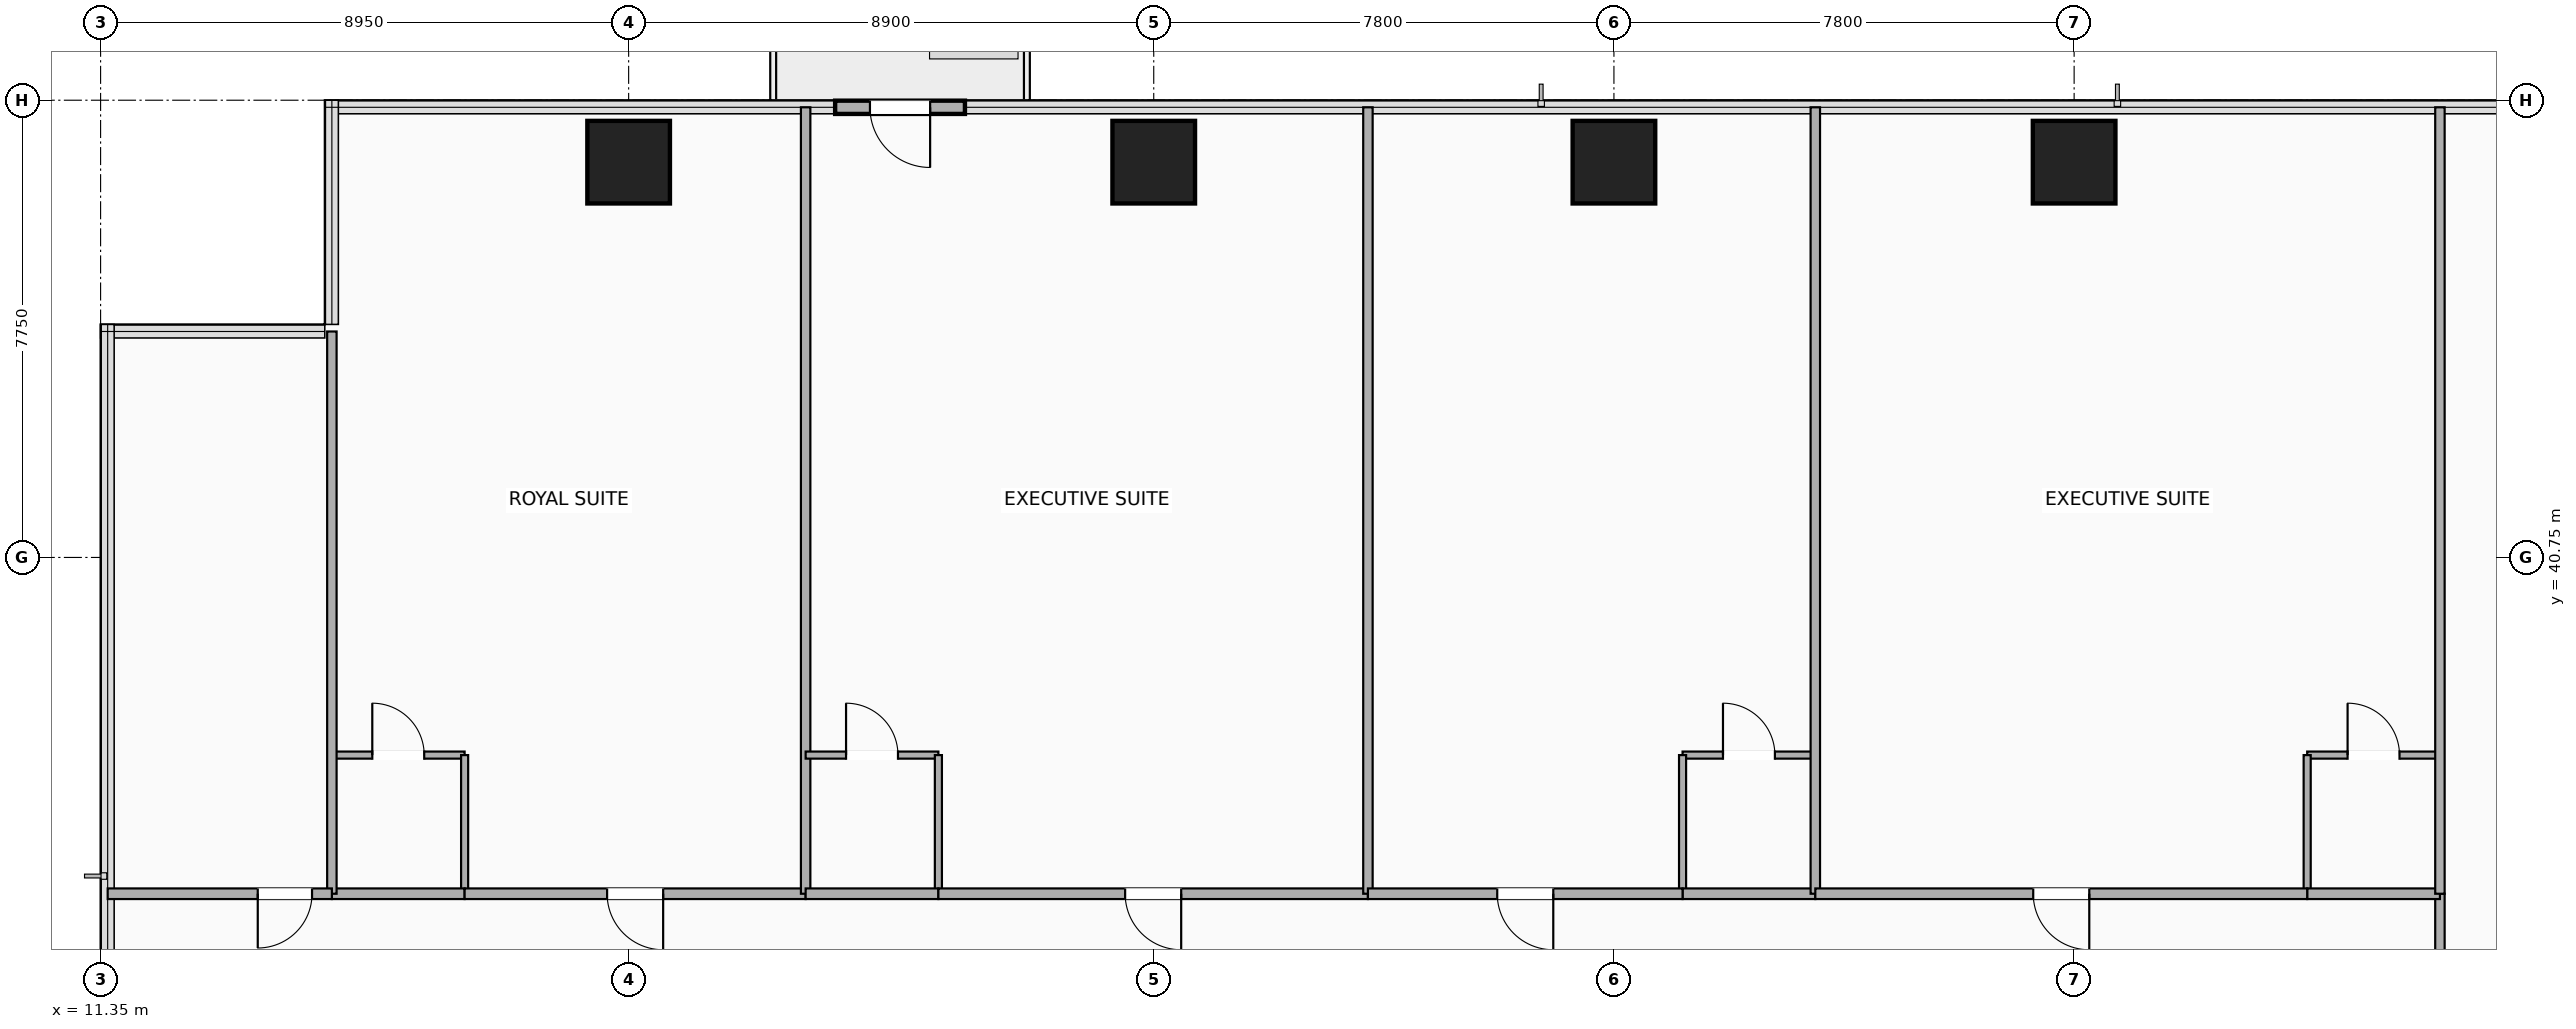
"""IFC4 building model, lengths in metres.
Left out: names, types, materials, properties, quantities, classifications, styles, units other than length and angle.
Written with IfcOpenShell. Run it as: python <this file> out.ifc"""

import sys

from ifc_helpers import new_model, si_unit, direction, frame, frame_2d, origin, origin_2d, place, context, subcontext, project, spatial, rectangle, extrude, element, fill, save


model = new_model("IFC4")
c1 = context("Model", 3, precision=1e-05, world=origin(), true_north=direction((0.0, 1.0)))
c2 = subcontext(c1, "Body", "Model", "MODEL_VIEW")
j1 = project(units=[si_unit("LENGTHUNIT", "METRE"), si_unit("PLANEANGLEUNIT", "RADIAN")], contexts=[c1])
p1 = place(None, origin())
s1 = spatial("IfcSite", under=j1, at=p1, CompositionType="ELEMENT")
p2 = place(p1, origin())
s2 = spatial("IfcBuilding", under=s1, at=p2, CompositionType="ELEMENT")
p3 = place(p2, frame((0.0, 0.0, 68.4)))
s3 = spatial("IfcBuildingStorey", under=s2, at=p3, CompositionType="ELEMENT", Elevation=68.4)
for number, where, z_axis, x_axis in (
    (1, (20.3, 47.45, -0.28), (0.0, 0.0, 1.0), (1.0, 0.0, 0.0)),
    (2, (29.2, 47.45, -0.28), (0.0, 0.0, 1.0), (1.0, 0.0, 0.0)),
    (3, (37.0, 47.45, -0.28), (0.0, 0.0, 1.0), (1.0, 0.0, 0.0)),
    (4, (44.8, 47.45, -0.28), (0.0, 0.0, 1.0), (1.0, 0.0, 0.0)),
):
    element("IfcColumn", number, at=place(p3, frame(where, z_axis=z_axis, x_axis=x_axis)), inside=s3, PredefinedType="COLUMN", context=c2, shape_type="SweptSolid", body=[
        extrude(rectangle(XDim=1.4, YDim=1.4, at=origin_2d()), origin(), (0.0, 0.0, 1.0), 3.5),
    ])
p4 = place(p3, frame((23.8, 48.38, 0.0), z_axis=(0.0, 0.0, 1.0), x_axis=(1.0, 0.0, 0.0)))
e5 = element("IfcWall", 5, at=p4, inside=s3, PredefinedType="SOLIDWALL", context=c2, shape_type="SweptSolid", body=[
    extrude(rectangle(XDim=2.2, YDim=0.225, at=frame_2d((1.1, 0.0))), origin(), (0.0, 0.0, 1.0), 3.22),
])
p5 = place(p4, frame((0.59, 0.0, 0.0)))
e6 = element("IfcOpeningElement", 6, at=p5, cuts=e5, PredefinedType="OPENING", context=c2, shape_type="SweptSolid", body=[
    extrude(rectangle(XDim=1.02, YDim=2.1, at=frame_2d((0.51, 1.05))), frame((0.0, 0.123, 0.0), z_axis=(0.0, -1.0, 0.0), x_axis=(1.0, 0.0, 0.0)), (0.0, 0.0, 1.0), 0.245),
])
p6 = place(p3, frame((51.0, 33.0, 0.0), z_axis=(0.0, 0.0, 1.0), x_axis=(0.0, 1.0, 0.0)))
e7 = element("IfcWall", 7, at=p6, inside=s3, PredefinedType="PARTITIONING", context=c2, shape_type="SweptSolid", body=[
    extrude(rectangle(XDim=2.05, YDim=0.16, at=frame_2d((1.025, 0.0))), origin(), (0.0, 0.0, 1.0), 2.51),
])
p7 = place(p3, frame((15.27, 37.4, 0.0), z_axis=(0.0, 0.0, 1.0), x_axis=(1.0, 0.0, 0.0)))
e8 = element("IfcWall", 8, at=p7, inside=s3, PredefinedType="PARTITIONING", context=c2, shape_type="SweptSolid", body=[
    extrude(rectangle(XDim=2.25, YDim=0.12, at=frame_2d((1.125, 0.0))), origin(), (0.0, 0.0, 1.0), 3.22),
])
p8 = place(p7, frame((1.565, 0.0, 0.0), z_axis=(0.0, 0.0, 1.0), x_axis=(-1.0, 0.0, 0.0)))
e9 = element("IfcOpeningElement", 9, at=p8, cuts=e8, PredefinedType="OPENING", context=c2, shape_type="SweptSolid", body=[
    extrude(rectangle(XDim=0.88, YDim=2.08, at=frame_2d((0.44, 1.04))), frame((0.0, 0.07, 0.0), z_axis=(0.0, -1.0, 0.0), x_axis=(1.0, 0.0, 0.0)), (0.0, 0.0, 1.0), 0.14),
])
p9 = place(p3, frame((17.52, 35.05, 0.0), z_axis=(0.0, 0.0, 1.0), x_axis=(0.0, 1.0, 0.0)))
e10 = element("IfcWall", 10, at=p9, inside=s3, PredefinedType="PARTITIONING", context=c2, shape_type="SweptSolid", body=[
    extrude(rectangle(XDim=2.35, YDim=0.12, at=frame_2d((1.175, 0.0))), origin(), (0.0, 0.0, 1.0), 3.22),
])
p10 = place(p3, frame((15.27, 35.05, 0.0), z_axis=(0.0, 0.0, 1.0), x_axis=(1.0, 0.0, 0.0)))
e11 = element("IfcWall", 11, at=p10, inside=s3, PredefinedType="PARTITIONING", context=c2, shape_type="SweptSolid", body=[
    extrude(rectangle(XDim=2.25, YDim=0.18, at=frame_2d((1.125, 0.0))), origin(), (0.0, 0.0, 1.0), 3.22),
])
p11 = place(p3, frame((17.52, 35.05, 0.0), z_axis=(0.0, 0.0, 1.0), x_axis=(1.0, 0.0, 0.0)))
e12 = element("IfcWall", 12, at=p11, inside=s3, PredefinedType="PARTITIONING", context=c2, shape_type="SweptSolid", body=[
    extrude(rectangle(XDim=5.78, YDim=0.18, at=frame_2d((2.89, 0.0))), origin(), (0.0, 0.0, 1.0), 2.51),
])
p12 = place(p11, frame((2.415, 0.0, 0.0)))
e13 = element("IfcOpeningElement", 13, at=p12, cuts=e12, PredefinedType="OPENING", context=c2, shape_type="SweptSolid", body=[
    extrude(rectangle(XDim=0.95, YDim=2.15, at=frame_2d((0.475, 1.075))), frame((0.0, 0.1, 0.0), z_axis=(0.0, -1.0, 0.0), x_axis=(1.0, 0.0, 0.0)), (0.0, 0.0, 1.0), 0.2),
])
p13 = place(p3, frame((15.27, 35.05, 0.0), z_axis=(0.0, 0.0, 1.0), x_axis=(0.0, 1.0, 0.0)))
e14 = element("IfcWall", 14, at=p13, inside=s3, PredefinedType="PARTITIONING", context=c2, shape_type="SweptSolid", body=[
    extrude(rectangle(XDim=9.53, YDim=0.16, at=frame_2d((4.765, 0.0))), origin(), (0.0, 0.0, 1.0), 3.22),
])
p14 = place(p3, frame((23.3, 35.05, 0.0), z_axis=(0.0, 0.0, 1.0), x_axis=(0.0, 1.0, 0.0)))
e15 = element("IfcWall", 15, at=p14, inside=s3, PredefinedType="PARTITIONING", context=c2, shape_type="SweptSolid", body=[
    extrude(rectangle(XDim=13.33, YDim=0.16, at=frame_2d((6.665, 0.0))), origin(), (0.0, 0.0, 1.0), 2.583),
])
p15 = place(p3, frame((23.3, 37.4, 0.0), z_axis=(0.0, 0.0, 1.0), x_axis=(1.0, 0.0, 0.0)))
e16 = element("IfcWall", 16, at=p15, inside=s3, PredefinedType="PARTITIONING", context=c2, shape_type="SweptSolid", body=[
    extrude(rectangle(XDim=2.25, YDim=0.12, at=frame_2d((1.125, 0.0))), origin(), (0.0, 0.0, 1.0), 3.22),
])
p16 = place(p15, frame((1.565, 0.0, 0.0), z_axis=(0.0, 0.0, 1.0), x_axis=(-1.0, 0.0, 0.0)))
e17 = element("IfcOpeningElement", 17, at=p16, cuts=e16, PredefinedType="OPENING", context=c2, shape_type="SweptSolid", body=[
    extrude(rectangle(XDim=0.88, YDim=2.08, at=frame_2d((0.44, 1.04))), frame((0.0, 0.07, 0.0), z_axis=(0.0, -1.0, 0.0), x_axis=(1.0, 0.0, 0.0)), (0.0, 0.0, 1.0), 0.14),
])
p17 = place(p3, frame((25.55, 35.05, 0.0), z_axis=(0.0, 0.0, 1.0), x_axis=(0.0, 1.0, 0.0)))
e18 = element("IfcWall", 18, at=p17, inside=s3, PredefinedType="PARTITIONING", context=c2, shape_type="SweptSolid", body=[
    extrude(rectangle(XDim=2.35, YDim=0.12, at=frame_2d((1.175, 0.0))), origin(), (0.0, 0.0, 1.0), 2.902),
])
p18 = place(p3, frame((23.3, 35.05, 0.0), z_axis=(0.0, 0.0, 1.0), x_axis=(1.0, 0.0, 0.0)))
e19 = element("IfcWall", 19, at=p18, inside=s3, PredefinedType="PARTITIONING", context=c2, shape_type="SweptSolid", body=[
    extrude(rectangle(XDim=2.25, YDim=0.18, at=frame_2d((1.125, 0.0))), origin(), (0.0, 0.0, 1.0), 3.22),
])
p19 = place(p3, frame((25.55, 35.05, 0.0), z_axis=(0.0, 0.0, 1.0), x_axis=(1.0, 0.0, 0.0)))
e20 = element("IfcWall", 20, at=p19, inside=s3, PredefinedType="PARTITIONING", context=c2, shape_type="SweptSolid", body=[
    extrude(rectangle(XDim=7.28, YDim=0.18, at=frame_2d((3.64, 0.0))), origin(), (0.0, 0.0, 1.0), 2.51),
])
p20 = place(p19, frame((3.165, 0.0, 0.0)))
e21 = element("IfcOpeningElement", 21, at=p20, cuts=e20, PredefinedType="OPENING", context=c2, shape_type="SweptSolid", body=[
    extrude(rectangle(XDim=0.95, YDim=2.15, at=frame_2d((0.475, 1.075))), frame((0.0, 0.1, 0.0), z_axis=(0.0, -1.0, 0.0), x_axis=(1.0, 0.0, 0.0)), (0.0, 0.0, 1.0), 0.2),
])
p21 = place(p3, frame((32.83, 35.05, 0.0), z_axis=(0.0, 0.0, 1.0), x_axis=(0.0, 1.0, 0.0)))
e22 = element("IfcWall", 22, at=p21, inside=s3, PredefinedType="PARTITIONING", context=c2, shape_type="SweptSolid", body=[
    extrude(rectangle(XDim=13.33, YDim=0.16, at=frame_2d((6.665, 0.0))), origin(), (0.0, 0.0, 1.0), 2.583),
])
p22 = place(p3, frame((38.163, 37.4, 0.0), z_axis=(0.0, 0.0, 1.0), x_axis=(1.0, 0.0, 0.0)))
e23 = element("IfcWall", 23, at=p22, inside=s3, PredefinedType="PARTITIONING", context=c2, shape_type="SweptSolid", body=[
    extrude(rectangle(XDim=2.25, YDim=0.12, at=frame_2d((1.125, 0.0))), origin(), (0.0, 0.0, 1.0), 3.22),
])
p23 = place(p22, frame((1.565, 0.0, 0.0), z_axis=(0.0, 0.0, 1.0), x_axis=(-1.0, 0.0, 0.0)))
e24 = element("IfcOpeningElement", 24, at=p23, cuts=e23, PredefinedType="OPENING", context=c2, shape_type="SweptSolid", body=[
    extrude(rectangle(XDim=0.88, YDim=2.08, at=frame_2d((0.44, 1.04))), frame((0.0, 0.07, 0.0), z_axis=(0.0, -1.0, 0.0), x_axis=(1.0, 0.0, 0.0)), (0.0, 0.0, 1.0), 0.14),
])
p24 = place(p3, frame((38.163, 35.05, 0.0), z_axis=(0.0, 0.0, 1.0), x_axis=(0.0, 1.0, 0.0)))
e25 = element("IfcWall", 25, at=p24, inside=s3, PredefinedType="PARTITIONING", context=c2, shape_type="SweptSolid", body=[
    extrude(rectangle(XDim=2.35, YDim=0.12, at=frame_2d((1.175, 0.0))), origin(), (0.0, 0.0, 1.0), 2.902),
])
p25 = place(p3, frame((38.163, 35.05, 0.0), z_axis=(0.0, 0.0, 1.0), x_axis=(1.0, 0.0, 0.0)))
e26 = element("IfcWall", 26, at=p25, inside=s3, PredefinedType="PARTITIONING", context=c2, shape_type="SweptSolid", body=[
    extrude(rectangle(XDim=2.25, YDim=0.18, at=frame_2d((1.125, 0.0))), origin(), (0.0, 0.0, 1.0), 3.22),
])
p26 = place(p3, frame((32.83, 35.05, 0.0), z_axis=(0.0, 0.0, 1.0), x_axis=(1.0, 0.0, 0.0)))
e27 = element("IfcWall", 27, at=p26, inside=s3, PredefinedType="PARTITIONING", context=c2, shape_type="SweptSolid", body=[
    extrude(rectangle(XDim=5.333, YDim=0.18, at=frame_2d((2.667, 0.0))), origin(), (0.0, 0.0, 1.0), 2.51),
])
p27 = place(p26, frame((2.191, 0.0, 0.0)))
e28 = element("IfcOpeningElement", 28, at=p27, cuts=e27, PredefinedType="OPENING", context=c2, shape_type="SweptSolid", body=[
    extrude(rectangle(XDim=0.95, YDim=2.15, at=frame_2d((0.475, 1.075))), frame((0.0, 0.1, 0.0), z_axis=(0.0, -1.0, 0.0), x_axis=(1.0, 0.0, 0.0)), (0.0, 0.0, 1.0), 0.2),
])
p28 = place(p3, frame((40.413, 35.05, 0.0), z_axis=(0.0, 0.0, 1.0), x_axis=(0.0, 1.0, 0.0)))
e29 = element("IfcWall", 29, at=p28, inside=s3, PredefinedType="PARTITIONING", context=c2, shape_type="SweptSolid", body=[
    extrude(rectangle(XDim=13.33, YDim=0.16, at=frame_2d((6.665, 0.0))), origin(), (0.0, 0.0, 1.0), 2.583),
])
p29 = place(p3, frame((48.75, 37.4, 0.0), z_axis=(0.0, 0.0, 1.0), x_axis=(1.0, 0.0, 0.0)))
e30 = element("IfcWall", 30, at=p29, inside=s3, PredefinedType="PARTITIONING", context=c2, shape_type="SweptSolid", body=[
    extrude(rectangle(XDim=2.25, YDim=0.12, at=frame_2d((1.125, 0.0))), origin(), (0.0, 0.0, 1.0), 3.22),
])
p30 = place(p29, frame((1.565, 0.0, 0.0), z_axis=(0.0, 0.0, 1.0), x_axis=(-1.0, 0.0, 0.0)))
e31 = element("IfcOpeningElement", 31, at=p30, cuts=e30, PredefinedType="OPENING", context=c2, shape_type="SweptSolid", body=[
    extrude(rectangle(XDim=0.88, YDim=2.08, at=frame_2d((0.44, 1.04))), frame((0.0, 0.07, 0.0), z_axis=(0.0, -1.0, 0.0), x_axis=(1.0, 0.0, 0.0)), (0.0, 0.0, 1.0), 0.14),
])
p31 = place(p3, frame((48.75, 35.05, 0.0), z_axis=(0.0, 0.0, 1.0), x_axis=(0.0, 1.0, 0.0)))
e32 = element("IfcWall", 32, at=p31, inside=s3, PredefinedType="PARTITIONING", context=c2, shape_type="SweptSolid", body=[
    extrude(rectangle(XDim=2.35, YDim=0.12, at=frame_2d((1.175, 0.0))), origin(), (0.0, 0.0, 1.0), 3.22),
])
p32 = place(p3, frame((48.75, 35.05, 0.0), z_axis=(0.0, 0.0, 1.0), x_axis=(1.0, 0.0, 0.0)))
e33 = element("IfcWall", 33, at=p32, inside=s3, PredefinedType="PARTITIONING", context=c2, shape_type="SweptSolid", body=[
    extrude(rectangle(XDim=2.25, YDim=0.18, at=frame_2d((1.125, 0.0))), origin(), (0.0, 0.0, 1.0), 3.22),
])
p33 = place(p3, frame((40.413, 35.05, 0.0), z_axis=(0.0, 0.0, 1.0), x_axis=(1.0, 0.0, 0.0)))
e34 = element("IfcWall", 34, at=p33, inside=s3, PredefinedType="PARTITIONING", context=c2, shape_type="SweptSolid", body=[
    extrude(rectangle(XDim=8.337, YDim=0.18, at=frame_2d((4.168, 0.0))), origin(), (0.0, 0.0, 1.0), 2.51),
])
p34 = place(p33, frame((3.693, 0.0, 0.0)))
e35 = element("IfcOpeningElement", 35, at=p34, cuts=e34, PredefinedType="OPENING", context=c2, shape_type="SweptSolid", body=[
    extrude(rectangle(XDim=0.95, YDim=2.15, at=frame_2d((0.475, 1.075))), frame((0.0, 0.1, 0.0), z_axis=(0.0, -1.0, 0.0), x_axis=(1.0, 0.0, 0.0)), (0.0, 0.0, 1.0), 0.2),
])
p35 = place(p3, frame((51.0, 35.05, 0.0), z_axis=(0.0, 0.0, 1.0), x_axis=(0.0, 1.0, 0.0)))
e36 = element("IfcWall", 36, at=p35, inside=s3, PredefinedType="PARTITIONING", context=c2, shape_type="SweptSolid", body=[
    extrude(rectangle(XDim=13.33, YDim=0.16, at=frame_2d((6.665, 0.0))), origin(), (0.0, 0.0, 1.0), 3.22),
])
p36 = place(p3, frame((11.47, 35.05, 0.0), z_axis=(0.0, 0.0, 1.0), x_axis=(1.0, 0.0, 0.0)))
e37 = element("IfcWall", 37, at=p36, inside=s3, PredefinedType="PARTITIONING", context=c2, shape_type="SweptSolid", body=[
    extrude(rectangle(XDim=3.8, YDim=0.18, at=frame_2d((1.9, 0.0))), origin(), (0.0, 0.0, 1.0), 3.22),
])
p37 = place(p36, frame((2.544, 0.0, 0.0)))
e38 = element("IfcOpeningElement", 38, at=p37, cuts=e37, PredefinedType="OPENING", context=c2, shape_type="SweptSolid", body=[
    extrude(rectangle(XDim=0.92, YDim=2.08, at=frame_2d((0.46, 1.04))), frame((0.0, 0.1, 0.0), z_axis=(0.0, -1.0, 0.0), x_axis=(1.0, 0.0, 0.0)), (0.0, 0.0, 1.0), 0.2),
])
p38 = place(p5, origin())
e39 = element("IfcDoor", 39, at=p38, inside=s3, OperationType="SINGLE_SWING_RIGHT", PredefinedType="DOOR", context=c2, shape_type="SweptSolid", body=[
    extrude(rectangle(XDim=1.02, YDim=2.1, at=frame_2d((0.51, 1.05))), frame((0.0, 0.025, 0.0), z_axis=(0.0, -1.0, 0.0), x_axis=(1.0, 0.0, 0.0)), (0.0, 0.0, 1.0), 0.05),
])
fill(e6, e39)
p39 = place(p8, origin())
e40 = element("IfcDoor", 40, at=p39, inside=s3, OperationType="SINGLE_SWING_LEFT", PredefinedType="DOOR", context=c2, shape_type="SweptSolid", body=[
    extrude(rectangle(XDim=0.88, YDim=2.08, at=frame_2d((0.44, 1.04))), frame((0.0, 0.025, 0.0), z_axis=(0.0, -1.0, 0.0), x_axis=(1.0, 0.0, 0.0)), (0.0, 0.0, 1.0), 0.05),
])
fill(e9, e40)
p40 = place(p12, origin())
e41 = element("IfcDoor", 41, at=p40, inside=s3, OperationType="SINGLE_SWING_RIGHT", PredefinedType="DOOR", context=c2, shape_type="SweptSolid", body=[
    extrude(rectangle(XDim=0.95, YDim=2.15, at=frame_2d((0.475, 1.075))), frame((0.0, 0.025, 0.0), z_axis=(0.0, -1.0, 0.0), x_axis=(1.0, 0.0, 0.0)), (0.0, 0.0, 1.0), 0.05),
])
fill(e13, e41)
p41 = place(p16, origin())
e42 = element("IfcDoor", 42, at=p41, inside=s3, OperationType="SINGLE_SWING_LEFT", PredefinedType="DOOR", context=c2, shape_type="SweptSolid", body=[
    extrude(rectangle(XDim=0.88, YDim=2.08, at=frame_2d((0.44, 1.04))), frame((0.0, 0.025, 0.0), z_axis=(0.0, -1.0, 0.0), x_axis=(1.0, 0.0, 0.0)), (0.0, 0.0, 1.0), 0.05),
])
fill(e17, e42)
p42 = place(p20, origin())
e43 = element("IfcDoor", 43, at=p42, inside=s3, OperationType="SINGLE_SWING_RIGHT", PredefinedType="DOOR", context=c2, shape_type="SweptSolid", body=[
    extrude(rectangle(XDim=0.95, YDim=2.15, at=frame_2d((0.475, 1.075))), frame((0.0, 0.025, 0.0), z_axis=(0.0, -1.0, 0.0), x_axis=(1.0, 0.0, 0.0)), (0.0, 0.0, 1.0), 0.05),
])
fill(e21, e43)
p43 = place(p23, origin())
e44 = element("IfcDoor", 44, at=p43, inside=s3, OperationType="SINGLE_SWING_LEFT", PredefinedType="DOOR", context=c2, shape_type="SweptSolid", body=[
    extrude(rectangle(XDim=0.88, YDim=2.08, at=frame_2d((0.44, 1.04))), frame((0.0, 0.025, 0.0), z_axis=(0.0, -1.0, 0.0), x_axis=(1.0, 0.0, 0.0)), (0.0, 0.0, 1.0), 0.05),
])
fill(e24, e44)
p44 = place(p27, origin())
e45 = element("IfcDoor", 45, at=p44, inside=s3, OperationType="SINGLE_SWING_RIGHT", PredefinedType="DOOR", context=c2, shape_type="SweptSolid", body=[
    extrude(rectangle(XDim=0.95, YDim=2.15, at=frame_2d((0.475, 1.075))), frame((0.0, 0.025, 0.0), z_axis=(0.0, -1.0, 0.0), x_axis=(1.0, 0.0, 0.0)), (0.0, 0.0, 1.0), 0.05),
])
fill(e28, e45)
p45 = place(p30, origin())
e46 = element("IfcDoor", 46, at=p45, inside=s3, OperationType="SINGLE_SWING_LEFT", PredefinedType="DOOR", context=c2, shape_type="SweptSolid", body=[
    extrude(rectangle(XDim=0.88, YDim=2.08, at=frame_2d((0.44, 1.04))), frame((0.0, 0.025, 0.0), z_axis=(0.0, -1.0, 0.0), x_axis=(1.0, 0.0, 0.0)), (0.0, 0.0, 1.0), 0.05),
])
fill(e31, e46)
p46 = place(p34, origin())
e47 = element("IfcDoor", 47, at=p46, inside=s3, OperationType="SINGLE_SWING_RIGHT", PredefinedType="DOOR", context=c2, shape_type="SweptSolid", body=[
    extrude(rectangle(XDim=0.95, YDim=2.15, at=frame_2d((0.475, 1.075))), frame((0.0, 0.025, 0.0), z_axis=(0.0, -1.0, 0.0), x_axis=(1.0, 0.0, 0.0)), (0.0, 0.0, 1.0), 0.05),
])
fill(e35, e47)
p47 = place(p37, origin())
e48 = element("IfcDoor", 48, at=p47, inside=s3, OperationType="SINGLE_SWING_LEFT", PredefinedType="DOOR", context=c2, shape_type="SweptSolid", body=[
    extrude(rectangle(XDim=0.92, YDim=2.08, at=frame_2d((0.46, 1.04))), frame((0.0, 0.025, 0.0), z_axis=(0.0, -1.0, 0.0), x_axis=(1.0, 0.0, 0.0)), (0.0, 0.0, 1.0), 0.05),
])
fill(e38, e48)
save(model, sys.argv[1])
